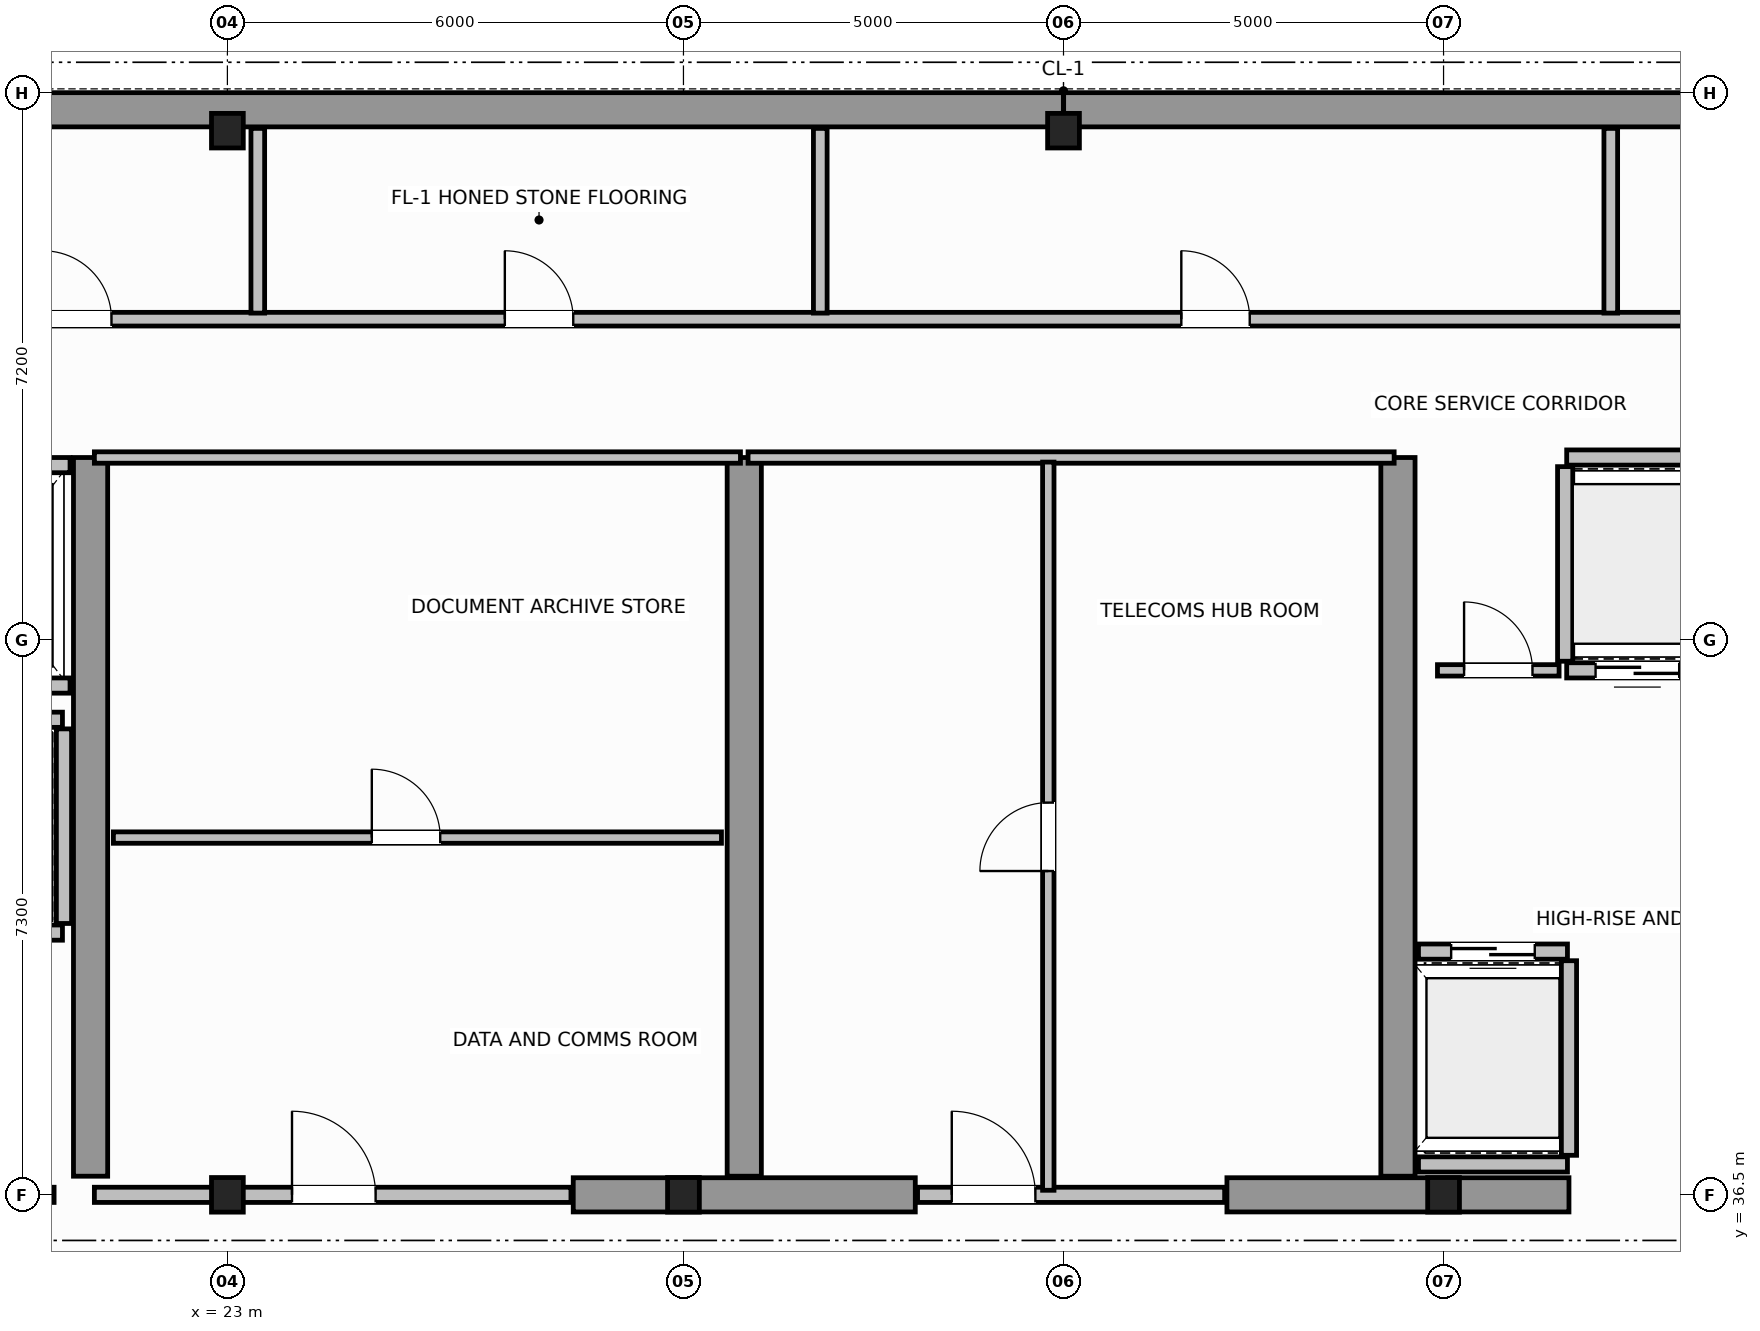
"""IFC4 building model, lengths in metres.
Left out: names, types, materials, properties, quantities, classifications, styles, units other than length and angle.
Written with IfcOpenShell. Run it as: python <this file> out.ifc"""

import sys

from ifc_helpers import new_model, si_unit, direction, frame, frame_2d, origin, origin_2d, place, context, subcontext, project, spatial, rectangle, i_section, extrude, source, transform, mapped, element, fill, save


model = new_model("IFC4")
c1 = context("Model", 3, precision=1e-05, world=origin(), true_north=direction((0.0, 1.0)))
c2 = subcontext(c1, "Body", "Model", "MODEL_VIEW")
j1 = project(units=[si_unit("LENGTHUNIT", "METRE"), si_unit("PLANEANGLEUNIT", "RADIAN")], contexts=[c1])
p1 = place(None, origin())
s1 = spatial("IfcSite", under=j1, at=p1, CompositionType="ELEMENT")
p2 = place(p1, origin())
s2 = spatial("IfcBuilding", under=s1, at=p2, CompositionType="ELEMENT")
p3 = place(p2, frame((0.0, 0.0, 253.6)))
s3 = spatial("IfcBuildingStorey", under=s2, at=p3, CompositionType="ELEMENT", Elevation=253.6)
m1 = source(origin(), c2, "Body", "SweptSolid", [
    extrude(i_section(OverallWidth=0.418, OverallDepth=0.455, WebThickness=0.042, FlangeThickness=0.058, FilletRadius=0.015, at=origin_2d()), origin(), (0.0, 0.0, 1.0), 3.8),
])
for number, where, z_axis, x_axis in (
    (1, (23.0, 36.5, 0.0), (0.0, 0.0, 1.0), (1.0, 0.0, 0.0)),
    (2, (29.0, 36.5, 0.0), (0.0, 0.0, 1.0), (1.0, 0.0, 0.0)),
    (3, (39.0, 36.5, 0.0), (0.0, 0.0, 1.0), (1.0, 0.0, 0.0)),
    (4, (23.0, 50.5, 0.0), (0.0, 0.0, 1.0), (1.0, 0.0, 0.0)),
    (5, (34.0, 50.5, 0.0), (0.0, 0.0, 1.0), (1.0, 0.0, 0.0)),
):
    element("IfcColumn", number, at=place(p3, frame(where, z_axis=z_axis, x_axis=x_axis)), inside=s3, PredefinedType="COLUMN", context=c2, shape_type="MappedRepresentation", body=[
        mapped(m1, transform((0.0, 0.0, 0.0), scale=1.0)),
    ])
for number, where, z_axis, x_axis in (
    (6, (14.229, 50.775, 0.0), (0.0, 0.0, 1.0), (1.0, 0.0, 0.0)),
    (7, (34.002, 50.775, 0.0), (0.0, 0.0, 1.0), (1.0, 0.0, 0.0)),
):
    element("IfcWall", number, at=place(p3, frame(where, z_axis=z_axis, x_axis=x_axis)), inside=s3, PredefinedType="SHEAR", context=c2, shape_type="SweptSolid", body=[
        extrude(rectangle(XDim=19.769, YDim=0.45, at=frame_2d((9.885, 0.0))), origin(), (0.0, 0.0, 1.0), 3.8),
    ])
for number, where, z_axis, x_axis in (
    (8, (27.55, 36.5, 0.0), (0.0, 0.0, 1.0), (1.0, 0.0, 0.0)),
    (9, (36.15, 36.5, 0.0), (0.0, 0.0, 1.0), (1.0, 0.0, 0.0)),
):
    element("IfcWall", number, at=place(p3, frame(where, z_axis=z_axis, x_axis=x_axis)), inside=s3, PredefinedType="SHEAR", context=c2, shape_type="SweptSolid", body=[
        extrude(rectangle(XDim=4.5, YDim=0.45, at=frame_2d((2.25, 0.0))), origin(), (0.0, 0.0, 1.0), 3.8),
    ])
for number, where, z_axis, x_axis in (
    (10, (21.2, 36.745, 0.0), (0.0, 0.0, 1.0), (0.0, 1.0, 0.0)),
    (11, (29.8, 36.745, 0.0), (0.0, 0.0, 1.0), (0.0, 1.0, 0.0)),
    (12, (38.4, 36.745, 0.0), (0.0, 0.0, 1.0), (0.0, 1.0, 0.0)),
):
    element("IfcWall", number, at=place(p3, frame(where, z_axis=z_axis, x_axis=x_axis)), inside=s3, PredefinedType="SHEAR", context=c2, shape_type="SweptSolid", body=[
        extrude(rectangle(XDim=9.455, YDim=0.45, at=frame_2d((4.728, 0.0))), origin(), (0.0, 0.0, 1.0), 3.8),
    ])
p4 = place(p3, frame((18.25, 36.5, 0.0), z_axis=(0.0, 0.0, 1.0), x_axis=(1.0, 0.0, 0.0)))
e13 = element("IfcWall", 13, at=p4, inside=s3, PredefinedType="SOLIDWALL", context=c2, shape_type="SweptSolid", body=[
    extrude(rectangle(XDim=2.47, YDim=0.2, at=frame_2d((1.235, 0.0))), origin(), (0.0, 0.0, 1.0), 2.57),
])
p5 = place(p4, frame((0.65, 0.0, 0.0)))
e14 = element("IfcOpeningElement", 14, at=p5, cuts=e13, PredefinedType="OPENING", context=c2, shape_type="SweptSolid", body=[
    extrude(rectangle(XDim=1.1, YDim=2.15, at=frame_2d((0.55, 1.075))), frame((0.0, 0.11, 0.0), z_axis=(0.0, -1.0, 0.0), x_axis=(1.0, 0.0, 0.0)), (0.0, 0.0, 1.0), 0.22),
])
p6 = place(p3, frame((38.67, 39.7, 0.0), z_axis=(0.0, 0.0, 1.0), x_axis=(1.0, 0.0, 0.0)))
e15 = element("IfcWall", 15, at=p6, inside=s3, PredefinedType="SOLIDWALL", context=c2, shape_type="SweptSolid", body=[
    extrude(rectangle(XDim=1.96, YDim=0.2, at=frame_2d((0.98, 0.0))), origin(), (0.0, 0.0, 1.0), 3.58),
])
p7 = place(p6, frame((0.43, 0.0, 0.0)))
e16 = element("IfcOpeningElement", 16, at=p7, cuts=e15, PredefinedType="OPENING", context=c2, shape_type="SweptSolid", body=[
    extrude(rectangle(XDim=1.1, YDim=2.15, at=frame_2d((0.55, 1.075))), frame((0.0, 0.11, 0.0), z_axis=(0.0, -1.0, 0.0), x_axis=(1.0, 0.0, 0.0)), (0.0, 0.0, 1.0), 0.22),
])
p8 = place(p3, frame((38.67, 36.9, 0.0), z_axis=(0.0, 0.0, 1.0), x_axis=(1.0, 0.0, 0.0)))
e17 = element("IfcWall", 17, at=p8, inside=s3, PredefinedType="SOLIDWALL", context=c2, shape_type="SweptSolid", body=[
    extrude(rectangle(XDim=1.96, YDim=0.2, at=frame_2d((0.98, 0.0))), origin(), (0.0, 0.0, 1.0), 3.58),
])
p9 = place(p3, frame((40.65, 37.02, 0.0), z_axis=(0.0, 0.0, 1.0), x_axis=(0.0, 1.0, 0.0)))
e18 = element("IfcWall", 18, at=p9, inside=s3, PredefinedType="SOLIDWALL", context=c2, shape_type="SweptSolid", body=[
    extrude(rectangle(XDim=2.56, YDim=0.2, at=frame_2d((1.28, 0.0))), origin(), (0.0, 0.0, 1.0), 3.58),
])
p10 = place(p3, frame((40.62, 43.4, 0.0), z_axis=(0.0, 0.0, 1.0), x_axis=(1.0, 0.0, 0.0)))
e19 = element("IfcWall", 19, at=p10, inside=s3, PredefinedType="SOLIDWALL", context=c2, shape_type="SweptSolid", body=[
    extrude(rectangle(XDim=1.86, YDim=0.2, at=frame_2d((0.93, 0.0))), origin(), (0.0, 0.0, 1.0), 3.58),
])
p11 = place(p10, frame((0.38, 0.0, 0.0)))
e20 = element("IfcOpeningElement", 20, at=p11, cuts=e19, PredefinedType="OPENING", context=c2, shape_type="SweptSolid", body=[
    extrude(rectangle(XDim=1.1, YDim=2.15, at=frame_2d((0.55, 1.075))), frame((0.0, 0.11, 0.0), z_axis=(0.0, -1.0, 0.0), x_axis=(1.0, 0.0, 0.0)), (0.0, 0.0, 1.0), 0.22),
])
p12 = place(p3, frame((40.62, 46.2, 0.0), z_axis=(0.0, 0.0, 1.0), x_axis=(1.0, 0.0, 0.0)))
e21 = element("IfcWall", 21, at=p12, inside=s3, PredefinedType="SOLIDWALL", context=c2, shape_type="SweptSolid", body=[
    extrude(rectangle(XDim=1.86, YDim=0.2, at=frame_2d((0.93, 0.0))), origin(), (0.0, 0.0, 1.0), 3.58),
])
p13 = place(p3, frame((40.6, 43.52, 0.0), z_axis=(0.0, 0.0, 1.0), x_axis=(0.0, 1.0, 0.0)))
e22 = element("IfcWall", 22, at=p13, inside=s3, PredefinedType="SOLIDWALL", context=c2, shape_type="SweptSolid", body=[
    extrude(rectangle(XDim=2.56, YDim=0.2, at=frame_2d((1.28, 0.0))), origin(), (0.0, 0.0, 1.0), 3.58),
])
p14 = place(p3, frame((18.67, 46.1, 0.0), z_axis=(0.0, 0.0, 1.0), x_axis=(1.0, 0.0, 0.0)))
e23 = element("IfcWall", 23, at=p14, inside=s3, PredefinedType="SOLIDWALL", context=c2, shape_type="SweptSolid", body=[
    extrude(rectangle(XDim=2.26, YDim=0.2, at=frame_2d((1.13, 0.0))), origin(), (0.0, 0.0, 1.0), 3.58),
])
p15 = place(p14, frame((0.58, 0.0, 0.0)))
e24 = element("IfcOpeningElement", 24, at=p15, cuts=e23, PredefinedType="OPENING", context=c2, shape_type="SweptSolid", body=[
    extrude(rectangle(XDim=1.1, YDim=2.15, at=frame_2d((0.55, 1.075))), frame((0.0, 0.11, 0.0), z_axis=(0.0, -1.0, 0.0), x_axis=(1.0, 0.0, 0.0)), (0.0, 0.0, 1.0), 0.22),
])
p16 = place(p3, frame((18.67, 43.2, 0.0), z_axis=(0.0, 0.0, 1.0), x_axis=(1.0, 0.0, 0.0)))
e25 = element("IfcWall", 25, at=p16, inside=s3, PredefinedType="SOLIDWALL", context=c2, shape_type="SweptSolid", body=[
    extrude(rectangle(XDim=2.26, YDim=0.2, at=frame_2d((1.13, 0.0))), origin(), (0.0, 0.0, 1.0), 3.58),
])
p17 = place(p3, frame((18.67, 39.95, 0.0), z_axis=(0.0, 0.0, 1.0), x_axis=(1.0, 0.0, 0.0)))
e26 = element("IfcWall", 26, at=p17, inside=s3, PredefinedType="SOLIDWALL", context=c2, shape_type="SweptSolid", body=[
    extrude(rectangle(XDim=2.16, YDim=0.2, at=frame_2d((1.08, 0.0))), origin(), (0.0, 0.0, 1.0), 3.58),
])
p18 = place(p17, frame((0.53, 0.0, 0.0)))
e27 = element("IfcOpeningElement", 27, at=p18, cuts=e26, PredefinedType="OPENING", context=c2, shape_type="SweptSolid", body=[
    extrude(rectangle(XDim=1.1, YDim=2.15, at=frame_2d((0.55, 1.075))), frame((0.0, 0.11, 0.0), z_axis=(0.0, -1.0, 0.0), x_axis=(1.0, 0.0, 0.0)), (0.0, 0.0, 1.0), 0.22),
])
p19 = place(p3, frame((18.67, 42.75, 0.0), z_axis=(0.0, 0.0, 1.0), x_axis=(1.0, 0.0, 0.0)))
e28 = element("IfcWall", 28, at=p19, inside=s3, PredefinedType="SOLIDWALL", context=c2, shape_type="SweptSolid", body=[
    extrude(rectangle(XDim=2.16, YDim=0.2, at=frame_2d((1.08, 0.0))), origin(), (0.0, 0.0, 1.0), 3.58),
])
p20 = place(p3, frame((20.85, 40.07, 0.0), z_axis=(0.0, 0.0, 1.0), x_axis=(0.0, 1.0, 0.0)))
e29 = element("IfcWall", 29, at=p20, inside=s3, PredefinedType="SOLIDWALL", context=c2, shape_type="SweptSolid", body=[
    extrude(rectangle(XDim=2.56, YDim=0.2, at=frame_2d((1.28, 0.0))), origin(), (0.0, 0.0, 1.0), 3.58),
])
p21 = place(p3, frame((21.25, 36.5, 0.0), z_axis=(0.0, 0.0, 1.0), x_axis=(1.0, 0.0, 0.0)))
e30 = element("IfcWall", 30, at=p21, inside=s3, PredefinedType="SOLIDWALL", context=c2, shape_type="SweptSolid", body=[
    extrude(rectangle(XDim=6.27, YDim=0.2, at=frame_2d((3.135, 0.0))), origin(), (0.0, 0.0, 1.0), 2.57),
])
p22 = place(p21, frame((2.6, 0.0, 0.0)))
e31 = element("IfcOpeningElement", 31, at=p22, cuts=e30, PredefinedType="OPENING", context=c2, shape_type="SweptSolid", body=[
    extrude(rectangle(XDim=1.1, YDim=2.15, at=frame_2d((0.55, 1.075))), frame((0.0, 0.11, 0.0), z_axis=(0.0, -1.0, 0.0), x_axis=(1.0, 0.0, 0.0)), (0.0, 0.0, 1.0), 0.22),
])
p23 = place(p3, frame((21.25, 46.2, 0.0), z_axis=(0.0, 0.0, 1.0), x_axis=(1.0, 0.0, 0.0)))
e32 = element("IfcWall", 32, at=p23, inside=s3, PredefinedType="PARTITIONING", context=c2, shape_type="SweptSolid", body=[
    extrude(rectangle(XDim=8.5, YDim=0.15, at=frame_2d((4.25, 0.0))), origin(), (0.0, 0.0, 1.0), 3.58),
])
p24 = place(p3, frame((21.5, 41.2, 0.0), z_axis=(0.0, 0.0, 1.0), x_axis=(1.0, 0.0, 0.0)))
e33 = element("IfcWall", 33, at=p24, inside=s3, PredefinedType="PARTITIONING", context=c2, shape_type="SweptSolid", body=[
    extrude(rectangle(XDim=8.0, YDim=0.15, at=frame_2d((4.0, 0.0))), origin(), (0.0, 0.0, 1.0), 3.58),
])
p25 = place(p24, frame((3.4, 0.0, 0.0)))
e34 = element("IfcOpeningElement", 34, at=p25, cuts=e33, PredefinedType="OPENING", context=c2, shape_type="SweptSolid", body=[
    extrude(rectangle(XDim=0.9, YDim=2.1, at=frame_2d((0.45, 1.05))), frame((0.0, 0.085, 0.0), z_axis=(0.0, -1.0, 0.0), x_axis=(1.0, 0.0, 0.0)), (0.0, 0.0, 1.0), 0.17),
])
p26 = place(p3, frame((32.08, 36.5, 0.0), z_axis=(0.0, 0.0, 1.0), x_axis=(1.0, 0.0, 0.0)))
e35 = element("IfcWall", 35, at=p26, inside=s3, PredefinedType="SOLIDWALL", context=c2, shape_type="SweptSolid", body=[
    extrude(rectangle(XDim=4.04, YDim=0.2, at=frame_2d((2.02, 0.0))), origin(), (0.0, 0.0, 1.0), 3.02),
])
p27 = place(p26, frame((0.45, 0.0, 0.0)))
e36 = element("IfcOpeningElement", 36, at=p27, cuts=e35, PredefinedType="OPENING", context=c2, shape_type="SweptSolid", body=[
    extrude(rectangle(XDim=1.1, YDim=2.15, at=frame_2d((0.55, 1.075))), frame((0.0, 0.11, 0.0), z_axis=(0.0, -1.0, 0.0), x_axis=(1.0, 0.0, 0.0)), (0.0, 0.0, 1.0), 0.22),
])
p28 = place(p3, frame((29.85, 46.2, 0.0), z_axis=(0.0, 0.0, 1.0), x_axis=(1.0, 0.0, 0.0)))
e37 = element("IfcWall", 37, at=p28, inside=s3, PredefinedType="PARTITIONING", context=c2, shape_type="SweptSolid", body=[
    extrude(rectangle(XDim=8.5, YDim=0.15, at=frame_2d((4.25, 0.0))), origin(), (0.0, 0.0, 1.0), 3.58),
])
p29 = place(p3, frame((33.8, 36.56, 0.0), z_axis=(0.0, 0.0, 1.0), x_axis=(0.0, 1.0, 0.0)))
e38 = element("IfcWall", 38, at=p29, inside=s3, PredefinedType="PARTITIONING", context=c2, shape_type="SweptSolid", body=[
    extrude(rectangle(XDim=9.58, YDim=0.15, at=frame_2d((4.79, 0.0))), origin(), (0.0, 0.0, 1.0), 3.58),
])
p30 = place(p29, frame((4.2, 0.0, 0.0)))
e39 = element("IfcOpeningElement", 39, at=p30, cuts=e38, PredefinedType="OPENING", context=c2, shape_type="SweptSolid", body=[
    extrude(rectangle(XDim=0.9, YDim=2.1, at=frame_2d((0.45, 1.05))), frame((0.0, 0.085, 0.0), z_axis=(0.0, -1.0, 0.0), x_axis=(1.0, 0.0, 0.0)), (0.0, 0.0, 1.0), 0.17),
])
p31 = place(p3, frame((38.92, 43.4, 0.0), z_axis=(0.0, 0.0, 1.0), x_axis=(1.0, 0.0, 0.0)))
e40 = element("IfcWall", 40, at=p31, inside=s3, PredefinedType="PARTITIONING", context=c2, shape_type="SweptSolid", body=[
    extrude(rectangle(XDim=1.6, YDim=0.15, at=frame_2d((0.8, 0.0))), origin(), (0.0, 0.0, 1.0), 3.58),
])
p32 = place(p31, frame((0.35, 0.0, 0.0)))
e41 = element("IfcOpeningElement", 41, at=p32, cuts=e40, PredefinedType="OPENING", context=c2, shape_type="SweptSolid", body=[
    extrude(rectangle(XDim=0.9, YDim=2.1, at=frame_2d((0.45, 1.05))), frame((0.0, 0.085, 0.0), z_axis=(0.0, -1.0, 0.0), x_axis=(1.0, 0.0, 0.0)), (0.0, 0.0, 1.0), 0.17),
])
p33 = place(p3, frame((18.62, 48.02, 0.0), z_axis=(0.0, 0.0, 1.0), x_axis=(1.0, 0.0, 0.0)))
e42 = element("IfcWall", 42, at=p33, inside=s3, PredefinedType="PLUMBINGWALL", context=c2, shape_type="SweptSolid", body=[
    extrude(rectangle(XDim=30.76, YDim=0.18, at=frame_2d((15.38, 0.0))), origin(), (0.0, 0.0, 1.0), 3.58),
])
p34 = place(p33, frame((1.955, 0.0, 0.0)))
e43 = element("IfcOpeningElement", 43, at=p34, cuts=e42, PredefinedType="OPENING", context=c2, shape_type="SweptSolid", body=[
    extrude(rectangle(XDim=0.9, YDim=2.15, at=frame_2d((0.45, 1.075))), frame((0.0, 0.1, 0.0), z_axis=(0.0, -1.0, 0.0), x_axis=(1.0, 0.0, 0.0)), (0.0, 0.0, 1.0), 0.2),
])
p35 = place(p33, frame((8.03, 0.0, 0.0)))
e44 = element("IfcOpeningElement", 44, at=p35, cuts=e42, PredefinedType="OPENING", context=c2, shape_type="SweptSolid", body=[
    extrude(rectangle(XDim=0.9, YDim=2.15, at=frame_2d((0.45, 1.075))), frame((0.0, 0.1, 0.0), z_axis=(0.0, -1.0, 0.0), x_axis=(1.0, 0.0, 0.0)), (0.0, 0.0, 1.0), 0.2),
])
p36 = place(p33, frame((16.93, 0.0, 0.0)))
e45 = element("IfcOpeningElement", 45, at=p36, cuts=e42, PredefinedType="OPENING", context=c2, shape_type="SweptSolid", body=[
    extrude(rectangle(XDim=0.9, YDim=2.15, at=frame_2d((0.45, 1.075))), frame((0.0, 0.1, 0.0), z_axis=(0.0, -1.0, 0.0), x_axis=(1.0, 0.0, 0.0)), (0.0, 0.0, 1.0), 0.2),
])
p37 = place(p33, frame((26.205, 0.0, 0.0)))
e46 = element("IfcOpeningElement", 46, at=p37, cuts=e42, PredefinedType="OPENING", context=c2, shape_type="SweptSolid", body=[
    extrude(rectangle(XDim=0.9, YDim=2.15, at=frame_2d((0.45, 1.075))), frame((0.0, 0.1, 0.0), z_axis=(0.0, -1.0, 0.0), x_axis=(1.0, 0.0, 0.0)), (0.0, 0.0, 1.0), 0.2),
])
for number, where, z_axis, x_axis in (
    (47, (23.4, 48.1, 0.0), (0.0, 0.0, 1.0), (0.0, 1.0, 0.0)),
    (48, (30.8, 48.1, 0.0), (0.0, 0.0, 1.0), (0.0, 1.0, 0.0)),
    (49, (41.2, 48.1, 0.0), (0.0, 0.0, 1.0), (0.0, 1.0, 0.0)),
):
    element("IfcWall", number, at=place(p3, frame(where, z_axis=z_axis, x_axis=x_axis)), inside=s3, PredefinedType="PLUMBINGWALL", context=c2, shape_type="SweptSolid", body=[
        extrude(rectangle(XDim=2.43, YDim=0.18, at=frame_2d((1.215, 0.0))), origin(), (0.0, 0.0, 1.0), 3.58),
    ])
m2 = source(origin(), c2, "Body", "SweptSolid", [
    extrude(rectangle(XDim=1.1, YDim=2.15, at=frame_2d((0.55, 1.075))), frame((0.0, 0.025, 0.0), z_axis=(0.0, -1.0, 0.0), x_axis=(1.0, 0.0, 0.0)), (0.0, 0.0, 1.0), 0.05),
])
p38 = place(p7, origin())
e50 = element("IfcDoor", 50, at=p38, inside=s3, OperationType="DOUBLE_DOOR_SLIDING", PredefinedType="DOOR", context=c2, shape_type="MappedRepresentation", body=[
    mapped(m2, transform((0.0, 0.0, 0.0), scale=1.0)),
])
fill(e16, e50)
p39 = place(p11, origin())
e51 = element("IfcDoor", 51, at=p39, inside=s3, OperationType="DOUBLE_DOOR_SLIDING", PredefinedType="DOOR", context=c2, shape_type="MappedRepresentation", body=[
    mapped(m2, transform((0.0, 0.0, 0.0), scale=1.0)),
])
fill(e20, e51)
p40 = place(p22, origin())
e52 = element("IfcDoor", 52, at=p40, inside=s3, OperationType="SINGLE_SWING_LEFT", PredefinedType="DOOR", context=c2, shape_type="MappedRepresentation", body=[
    mapped(m2, transform((0.0, 0.0, 0.0), scale=1.0)),
])
fill(e31, e52)
m3 = source(origin(), c2, "Body", "SweptSolid", [
    extrude(rectangle(XDim=0.9, YDim=2.1, at=frame_2d((0.45, 1.05))), frame((0.0, 0.025, 0.0), z_axis=(0.0, -1.0, 0.0), x_axis=(1.0, 0.0, 0.0)), (0.0, 0.0, 1.0), 0.05),
])
p41 = place(p25, origin())
e53 = element("IfcDoor", 53, at=p41, inside=s3, OperationType="SINGLE_SWING_RIGHT", PredefinedType="DOOR", context=c2, shape_type="MappedRepresentation", body=[
    mapped(m3, transform((0.0, 0.0, 0.0), scale=1.0)),
])
fill(e34, e53)
p42 = place(p27, origin())
e54 = element("IfcDoor", 54, at=p42, inside=s3, OperationType="SINGLE_SWING_LEFT", PredefinedType="DOOR", context=c2, shape_type="MappedRepresentation", body=[
    mapped(m2, transform((0.0, 0.0, 0.0), scale=1.0)),
])
fill(e36, e54)
p43 = place(p30, origin())
e55 = element("IfcDoor", 55, at=p43, inside=s3, OperationType="SINGLE_SWING_RIGHT", PredefinedType="DOOR", context=c2, shape_type="MappedRepresentation", body=[
    mapped(m3, transform((0.0, 0.0, 0.0), scale=1.0)),
])
fill(e39, e55)
p44 = place(p32, origin())
e56 = element("IfcDoor", 56, at=p44, inside=s3, OperationType="SINGLE_SWING_LEFT", PredefinedType="DOOR", context=c2, shape_type="MappedRepresentation", body=[
    mapped(m3, transform((0.0, 0.0, 0.0), scale=1.0)),
])
fill(e41, e56)
m4 = source(origin(), c2, "Body", "SweptSolid", [
    extrude(rectangle(XDim=0.9, YDim=2.15, at=frame_2d((0.45, 1.075))), frame((0.0, 0.025, 0.0), z_axis=(0.0, -1.0, 0.0), x_axis=(1.0, 0.0, 0.0)), (0.0, 0.0, 1.0), 0.05),
])
p45 = place(p34, origin())
e57 = element("IfcDoor", 57, at=p45, inside=s3, OperationType="SINGLE_SWING_LEFT", PredefinedType="DOOR", context=c2, shape_type="MappedRepresentation", body=[
    mapped(m4, transform((0.0, 0.0, 0.0), scale=1.0)),
])
fill(e43, e57)
p46 = place(p35, origin())
e58 = element("IfcDoor", 58, at=p46, inside=s3, OperationType="SINGLE_SWING_RIGHT", PredefinedType="DOOR", context=c2, shape_type="MappedRepresentation", body=[
    mapped(m4, transform((0.0, 0.0, 0.0), scale=1.0)),
])
fill(e44, e58)
p47 = place(p36, origin())
e59 = element("IfcDoor", 59, at=p47, inside=s3, OperationType="SINGLE_SWING_LEFT", PredefinedType="DOOR", context=c2, shape_type="MappedRepresentation", body=[
    mapped(m4, transform((0.0, 0.0, 0.0), scale=1.0)),
])
fill(e45, e59)
save(model, sys.argv[1])
